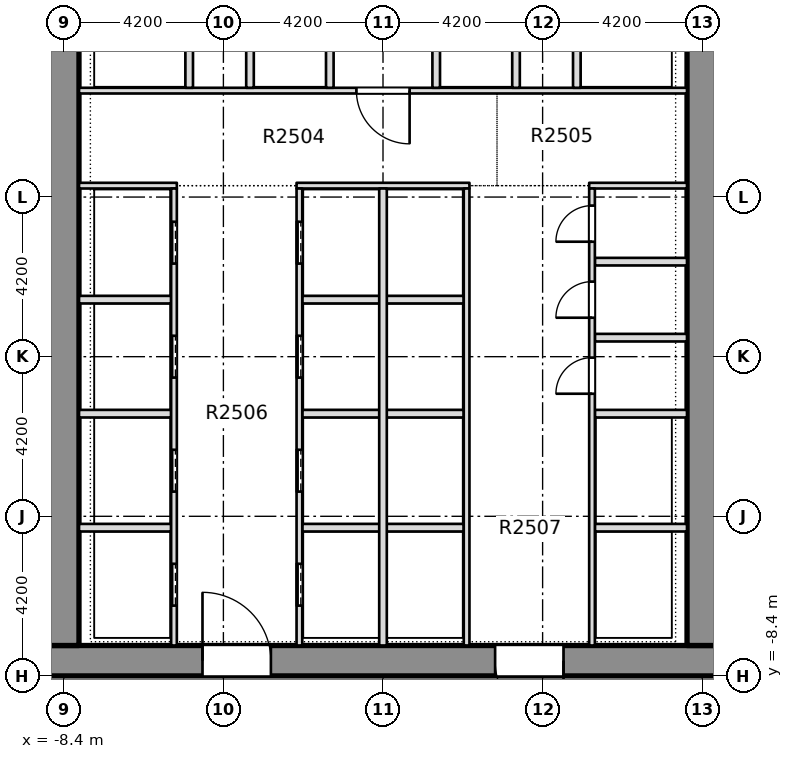
"""IFC4 building model, lengths in metres.
Left out: names, types, materials, properties, quantities, classifications, styles, units other than length and angle.
Written with IfcOpenShell. Run it as: python <this file> out.ifc"""

import sys

from ifc_helpers import new_model, si_unit, direction, frame, frame_2d, origin, place, context, subcontext, project, spatial, rectangle, extrude, element, fill, save


model = new_model("IFC4")
c1 = context("Model", 3, precision=1e-05, world=origin(), true_north=direction((0.0, 1.0)))
c2 = subcontext(c1, "Body", "Model", "MODEL_VIEW")
j1 = project(units=[si_unit("LENGTHUNIT", "METRE"), si_unit("PLANEANGLEUNIT", "RADIAN")], contexts=[c1])
p1 = place(None, origin())
s1 = spatial("IfcSite", under=j1, at=p1, CompositionType="ELEMENT")
p2 = place(p1, origin())
s2 = spatial("IfcBuilding", under=s1, at=p2, CompositionType="ELEMENT")
p3 = place(p2, frame((0.0, 0.0, 101.1)))
s3 = spatial("IfcBuildingStorey", under=s2, at=p3, CompositionType="ELEMENT", Elevation=101.1)
p4 = place(p3, frame((-11.8, -8.0, -0.32), z_axis=(0.0, 0.0, 1.0), x_axis=(1.0, 0.0, 0.0)))
e1 = element("IfcWall", 1, at=p4, inside=s3, PredefinedType="SHEAR", context=c2, shape_type="SweptSolid", body=[
    extrude(rectangle(XDim=23.6, YDim=0.8, at=frame_2d((11.8, 0.0))), origin(), (0.0, 0.0, 1.0), 3.45),
])
p5 = place(p4, frame((7.05, 0.0, 0.32)))
e2 = element("IfcOpeningElement", 2, at=p5, cuts=e1, PredefinedType="OPENING", context=c2, shape_type="SweptSolid", body=[
    extrude(rectangle(XDim=1.8, YDim=2.1, at=frame_2d((0.9, 1.05))), frame((0.0, 0.41, 0.0), z_axis=(0.0, -1.0, 0.0), x_axis=(1.0, 0.0, 0.0)), (0.0, 0.0, 1.0), 0.82),
])
p6 = place(p4, frame((14.75, 0.0, 0.32)))
e3 = element("IfcOpeningElement", 3, at=p6, cuts=e1, PredefinedType="OPENING", context=c2, shape_type="SweptSolid", body=[
    extrude(rectangle(XDim=1.8, YDim=2.1, at=frame_2d((0.9, 1.05))), frame((0.0, 0.41, 0.0), z_axis=(0.0, -1.0, 0.0), x_axis=(1.0, 0.0, 0.0)), (0.0, 0.0, 1.0), 0.82),
])
p7 = place(p3, frame((-8.4, -7.6, -0.32), z_axis=(0.0, 0.0, 1.0), x_axis=(0.0, 1.0, 0.0)))
e4 = element("IfcWall", 4, at=p7, inside=s3, PredefinedType="SHEAR", context=c2, shape_type="SweptSolid", body=[
    extrude(rectangle(XDim=28.55, YDim=0.8, at=frame_2d((14.275, 0.0))), origin(), (0.0, 0.0, 1.0), 3.45),
])
p8 = place(p7, frame((18.5, 0.0, 0.32)))
e5 = element("IfcOpeningElement", 5, at=p8, cuts=e4, PredefinedType="OPENING", context=c2, shape_type="SweptSolid", body=[
    extrude(rectangle(XDim=1.2, YDim=2.1, at=frame_2d((0.6, 1.05))), frame((0.0, 0.41, 0.0), z_axis=(0.0, -1.0, 0.0), x_axis=(1.0, 0.0, 0.0)), (0.0, 0.0, 1.0), 0.82),
])
p9 = place(p3, frame((8.4, -7.6, -0.32), z_axis=(0.0, 0.0, 1.0), x_axis=(0.0, 1.0, 0.0)))
e6 = element("IfcWall", 6, at=p9, inside=s3, PredefinedType="SHEAR", context=c2, shape_type="SweptSolid", body=[
    extrude(rectangle(XDim=28.55, YDim=0.8, at=frame_2d((14.275, 0.0))), origin(), (0.0, 0.0, 1.0), 3.45),
])
p10 = place(p9, frame((18.5, 0.0, 0.32)))
e7 = element("IfcOpeningElement", 7, at=p10, cuts=e6, PredefinedType="OPENING", context=c2, shape_type="SweptSolid", body=[
    extrude(rectangle(XDim=1.2, YDim=2.1, at=frame_2d((0.6, 1.05))), frame((0.0, 0.41, 0.0), z_axis=(0.0, -1.0, 0.0), x_axis=(1.0, 0.0, 0.0)), (0.0, 0.0, 1.0), 0.82),
])
p11 = place(p3, frame((-7.999, -4.5, 0.0), z_axis=(0.0, 0.0, 1.0), x_axis=(1.0, 0.0, 0.0)))
e8 = element("IfcWall", 8, at=p11, inside=s3, PredefinedType="PARTITIONING", context=c2, shape_type="SweptSolid", body=[
    extrude(rectangle(XDim=2.424, YDim=0.2, at=frame_2d((1.212, 0.0))), origin(), (0.0, 0.0, 1.0), 3.13),
])
p12 = place(p3, frame((-2.125, -4.5, 0.0), z_axis=(0.0, 0.0, 1.0), x_axis=(1.0, 0.0, 0.0)))
e9 = element("IfcWall", 9, at=p12, inside=s3, PredefinedType="PARTITIONING", context=c2, shape_type="SweptSolid", body=[
    extrude(rectangle(XDim=4.25, YDim=0.2, at=frame_2d((2.125, 0.0))), origin(), (0.0, 0.0, 1.0), 3.13),
])
for number, where, z_axis, x_axis in (
    (10, (5.575, -4.5, 0.0), (0.0, 0.0, 1.0), (1.0, 0.0, 0.0)),
    (11, (-7.999, -1.5, 0.0), (0.0, 0.0, 1.0), (1.0, 0.0, 0.0)),
):
    element("IfcWall", number, at=place(p3, frame(where, z_axis=z_axis, x_axis=x_axis)), inside=s3, PredefinedType="PARTITIONING", context=c2, shape_type="SweptSolid", body=[
        extrude(rectangle(XDim=2.424, YDim=0.2, at=frame_2d((1.212, 0.0))), origin(), (0.0, 0.0, 1.0), 3.13),
    ])
p13 = place(p3, frame((-2.125, -1.5, 0.0), z_axis=(0.0, 0.0, 1.0), x_axis=(1.0, 0.0, 0.0)))
e12 = element("IfcWall", 12, at=p13, inside=s3, PredefinedType="PARTITIONING", context=c2, shape_type="SweptSolid", body=[
    extrude(rectangle(XDim=4.25, YDim=0.2, at=frame_2d((2.125, 0.0))), origin(), (0.0, 0.0, 1.0), 3.13),
])
for number, where, z_axis, x_axis in (
    (13, (5.575, -1.5, 0.0), (0.0, 0.0, 1.0), (1.0, 0.0, 0.0)),
    (14, (5.575, 0.5, 0.0), (0.0, 0.0, 1.0), (1.0, 0.0, 0.0)),
    (15, (-7.999, 1.5, 0.0), (0.0, 0.0, 1.0), (1.0, 0.0, 0.0)),
):
    element("IfcWall", number, at=place(p3, frame(where, z_axis=z_axis, x_axis=x_axis)), inside=s3, PredefinedType="PARTITIONING", context=c2, shape_type="SweptSolid", body=[
        extrude(rectangle(XDim=2.424, YDim=0.2, at=frame_2d((1.212, 0.0))), origin(), (0.0, 0.0, 1.0), 3.13),
    ])
p14 = place(p3, frame((-2.125, 1.5, 0.0), z_axis=(0.0, 0.0, 1.0), x_axis=(1.0, 0.0, 0.0)))
e16 = element("IfcWall", 16, at=p14, inside=s3, PredefinedType="PARTITIONING", context=c2, shape_type="SweptSolid", body=[
    extrude(rectangle(XDim=4.25, YDim=0.2, at=frame_2d((2.125, 0.0))), origin(), (0.0, 0.0, 1.0), 3.13),
])
p15 = place(p3, frame((5.575, 2.5, 0.0), z_axis=(0.0, 0.0, 1.0), x_axis=(1.0, 0.0, 0.0)))
e17 = element("IfcWall", 17, at=p15, inside=s3, PredefinedType="PARTITIONING", context=c2, shape_type="SweptSolid", body=[
    extrude(rectangle(XDim=2.424, YDim=0.2, at=frame_2d((1.212, 0.0))), origin(), (0.0, 0.0, 1.0), 3.13),
])
p16 = place(p3, frame((-7.999, 4.5, 0.0), z_axis=(0.0, 0.0, 1.0), x_axis=(1.0, 0.0, 0.0)))
e18 = element("IfcWall", 18, at=p16, inside=s3, PredefinedType="PARTITIONING", context=c2, shape_type="SweptSolid", body=[
    extrude(rectangle(XDim=2.574, YDim=0.15, at=frame_2d((1.287, 0.0))), origin(), (0.0, 0.0, 1.0), 3.13),
])
p17 = place(p3, frame((-2.275, 4.5, 0.0), z_axis=(0.0, 0.0, 1.0), x_axis=(1.0, 0.0, 0.0)))
e19 = element("IfcWall", 19, at=p17, inside=s3, PredefinedType="PARTITIONING", context=c2, shape_type="SweptSolid", body=[
    extrude(rectangle(XDim=4.55, YDim=0.15, at=frame_2d((2.275, 0.0))), origin(), (0.0, 0.0, 1.0), 3.13),
])
p18 = place(p3, frame((5.425, 4.5, 0.0), z_axis=(0.0, 0.0, 1.0), x_axis=(1.0, 0.0, 0.0)))
e20 = element("IfcWall", 20, at=p18, inside=s3, PredefinedType="PARTITIONING", context=c2, shape_type="SweptSolid", body=[
    extrude(rectangle(XDim=2.574, YDim=0.15, at=frame_2d((1.287, 0.0))), origin(), (0.0, 0.0, 1.0), 3.13),
])
p19 = place(p3, frame((-7.999, 7.0, 0.0), z_axis=(0.0, 0.0, 1.0), x_axis=(1.0, 0.0, 0.0)))
e21 = element("IfcWall", 21, at=p19, inside=s3, PredefinedType="PARTITIONING", context=c2, shape_type="SweptSolid", body=[
    extrude(rectangle(XDim=15.998, YDim=0.15, at=frame_2d((7.999, 0.0))), origin(), (0.0, 0.0, 1.0), 3.13),
])
p20 = place(p19, frame((7.299, 0.0, 0.0)))
e22 = element("IfcOpeningElement", 22, at=p20, cuts=e21, PredefinedType="OPENING", context=c2, shape_type="SweptSolid", body=[
    extrude(rectangle(XDim=1.4, YDim=2.1, at=frame_2d((0.7, 1.05))), frame((0.0, 0.085, 0.0), z_axis=(0.0, -1.0, 0.0), x_axis=(1.0, 0.0, 0.0)), (0.0, 0.0, 1.0), 0.17),
])
p21 = place(p3, frame((-5.5, -7.599, 0.0), z_axis=(0.0, 0.0, 1.0), x_axis=(0.0, 1.0, 0.0)))
e23 = element("IfcWall", 23, at=p21, inside=s3, PredefinedType="PARTITIONING", context=c2, shape_type="SweptSolid", body=[
    extrude(rectangle(XDim=12.024, YDim=0.15, at=frame_2d((6.012, 0.0))), origin(), (0.0, 0.0, 1.0), 3.13),
])
p22 = place(p21, frame((1.049, 0.0, 0.0)))
e24 = element("IfcOpeningElement", 24, at=p22, cuts=e23, PredefinedType="OPENING", context=c2, shape_type="SweptSolid", body=[
    extrude(rectangle(XDim=1.1, YDim=2.1, at=frame_2d((0.55, 1.05))), frame((0.0, 0.085, 0.0), z_axis=(0.0, -1.0, 0.0), x_axis=(1.0, 0.0, 0.0)), (0.0, 0.0, 1.0), 0.17),
])
p23 = place(p21, frame((4.049, 0.0, 0.0)))
e25 = element("IfcOpeningElement", 25, at=p23, cuts=e23, PredefinedType="OPENING", context=c2, shape_type="SweptSolid", body=[
    extrude(rectangle(XDim=1.1, YDim=2.1, at=frame_2d((0.55, 1.05))), frame((0.0, 0.085, 0.0), z_axis=(0.0, -1.0, 0.0), x_axis=(1.0, 0.0, 0.0)), (0.0, 0.0, 1.0), 0.17),
])
p24 = place(p21, frame((7.049, 0.0, 0.0)))
e26 = element("IfcOpeningElement", 26, at=p24, cuts=e23, PredefinedType="OPENING", context=c2, shape_type="SweptSolid", body=[
    extrude(rectangle(XDim=1.1, YDim=2.1, at=frame_2d((0.55, 1.05))), frame((0.0, 0.085, 0.0), z_axis=(0.0, -1.0, 0.0), x_axis=(1.0, 0.0, 0.0)), (0.0, 0.0, 1.0), 0.17),
])
p25 = place(p21, frame((10.049, 0.0, 0.0)))
e27 = element("IfcOpeningElement", 27, at=p25, cuts=e23, PredefinedType="OPENING", context=c2, shape_type="SweptSolid", body=[
    extrude(rectangle(XDim=1.1, YDim=2.1, at=frame_2d((0.55, 1.05))), frame((0.0, 0.085, 0.0), z_axis=(0.0, -1.0, 0.0), x_axis=(1.0, 0.0, 0.0)), (0.0, 0.0, 1.0), 0.17),
])
p26 = place(p3, frame((-5.1, 7.075, 0.0), z_axis=(0.0, 0.0, 1.0), x_axis=(0.0, 1.0, 0.0)))
e28 = element("IfcWall", 28, at=p26, inside=s3, PredefinedType="PARTITIONING", context=c2, shape_type="SweptSolid", body=[
    extrude(rectangle(XDim=2.725, YDim=0.2, at=frame_2d((1.363, 0.0))), origin(), (0.0, 0.0, 1.0), 3.13),
])
p27 = place(p3, frame((-3.5, 7.075, 0.0), z_axis=(0.0, 0.0, 1.0), x_axis=(0.0, 1.0, 0.0)))
e29 = element("IfcWall", 29, at=p27, inside=s3, PredefinedType="PARTITIONING", context=c2, shape_type="SweptSolid", body=[
    extrude(rectangle(XDim=2.85, YDim=0.2, at=frame_2d((1.425, 0.0))), origin(), (0.0, 0.0, 1.0), 3.13),
])
p28 = place(p3, frame((-2.2, -7.599, 0.0), z_axis=(0.0, 0.0, 1.0), x_axis=(0.0, 1.0, 0.0)))
e30 = element("IfcWall", 30, at=p28, inside=s3, PredefinedType="PARTITIONING", context=c2, shape_type="SweptSolid", body=[
    extrude(rectangle(XDim=12.024, YDim=0.15, at=frame_2d((6.012, 0.0))), origin(), (0.0, 0.0, 1.0), 3.13),
])
p29 = place(p28, frame((1.049, 0.0, 0.0)))
e31 = element("IfcOpeningElement", 31, at=p29, cuts=e30, PredefinedType="OPENING", context=c2, shape_type="SweptSolid", body=[
    extrude(rectangle(XDim=1.1, YDim=2.1, at=frame_2d((0.55, 1.05))), frame((0.0, 0.085, 0.0), z_axis=(0.0, -1.0, 0.0), x_axis=(1.0, 0.0, 0.0)), (0.0, 0.0, 1.0), 0.17),
])
p30 = place(p28, frame((4.049, 0.0, 0.0)))
e32 = element("IfcOpeningElement", 32, at=p30, cuts=e30, PredefinedType="OPENING", context=c2, shape_type="SweptSolid", body=[
    extrude(rectangle(XDim=1.1, YDim=2.1, at=frame_2d((0.55, 1.05))), frame((0.0, 0.085, 0.0), z_axis=(0.0, -1.0, 0.0), x_axis=(1.0, 0.0, 0.0)), (0.0, 0.0, 1.0), 0.17),
])
p31 = place(p28, frame((7.049, 0.0, 0.0)))
e33 = element("IfcOpeningElement", 33, at=p31, cuts=e30, PredefinedType="OPENING", context=c2, shape_type="SweptSolid", body=[
    extrude(rectangle(XDim=1.1, YDim=2.1, at=frame_2d((0.55, 1.05))), frame((0.0, 0.085, 0.0), z_axis=(0.0, -1.0, 0.0), x_axis=(1.0, 0.0, 0.0)), (0.0, 0.0, 1.0), 0.17),
])
p32 = place(p28, frame((10.049, 0.0, 0.0)))
e34 = element("IfcOpeningElement", 34, at=p32, cuts=e30, PredefinedType="OPENING", context=c2, shape_type="SweptSolid", body=[
    extrude(rectangle(XDim=1.1, YDim=2.1, at=frame_2d((0.55, 1.05))), frame((0.0, 0.085, 0.0), z_axis=(0.0, -1.0, 0.0), x_axis=(1.0, 0.0, 0.0)), (0.0, 0.0, 1.0), 0.17),
])
p33 = place(p3, frame((-1.4, 7.075, 0.0), z_axis=(0.0, 0.0, 1.0), x_axis=(0.0, 1.0, 0.0)))
e35 = element("IfcWall", 35, at=p33, inside=s3, PredefinedType="PARTITIONING", context=c2, shape_type="SweptSolid", body=[
    extrude(rectangle(XDim=2.85, YDim=0.2, at=frame_2d((1.425, 0.0))), origin(), (0.0, 0.0, 1.0), 3.13),
])
p34 = place(p3, frame((0.0, -7.599, 0.0), z_axis=(0.0, 0.0, 1.0), x_axis=(0.0, 1.0, 0.0)))
e36 = element("IfcWall", 36, at=p34, inside=s3, PredefinedType="PARTITIONING", context=c2, shape_type="SweptSolid", body=[
    extrude(rectangle(XDim=12.024, YDim=0.2, at=frame_2d((6.012, 0.0))), origin(), (0.0, 0.0, 1.0), 3.13),
])
p35 = place(p3, frame((1.4, 7.075, 0.0), z_axis=(0.0, 0.0, 1.0), x_axis=(0.0, 1.0, 0.0)))
e37 = element("IfcWall", 37, at=p35, inside=s3, PredefinedType="PARTITIONING", context=c2, shape_type="SweptSolid", body=[
    extrude(rectangle(XDim=2.85, YDim=0.2, at=frame_2d((1.425, 0.0))), origin(), (0.0, 0.0, 1.0), 3.13),
])
p36 = place(p3, frame((2.2, -7.599, 0.0), z_axis=(0.0, 0.0, 1.0), x_axis=(0.0, 1.0, 0.0)))
e38 = element("IfcWall", 38, at=p36, inside=s3, PredefinedType="PARTITIONING", context=c2, shape_type="SweptSolid", body=[
    extrude(rectangle(XDim=12.024, YDim=0.15, at=frame_2d((6.012, 0.0))), origin(), (0.0, 0.0, 1.0), 3.13),
])
p37 = place(p3, frame((3.5, 7.075, 0.0), z_axis=(0.0, 0.0, 1.0), x_axis=(0.0, 1.0, 0.0)))
e39 = element("IfcWall", 39, at=p37, inside=s3, PredefinedType="PARTITIONING", context=c2, shape_type="SweptSolid", body=[
    extrude(rectangle(XDim=2.85, YDim=0.2, at=frame_2d((1.425, 0.0))), origin(), (0.0, 0.0, 1.0), 3.13),
])
p38 = place(p3, frame((5.1, 7.075, 0.0), z_axis=(0.0, 0.0, 1.0), x_axis=(0.0, 1.0, 0.0)))
e40 = element("IfcWall", 40, at=p38, inside=s3, PredefinedType="PARTITIONING", context=c2, shape_type="SweptSolid", body=[
    extrude(rectangle(XDim=2.725, YDim=0.2, at=frame_2d((1.363, 0.0))), origin(), (0.0, 0.0, 1.0), 3.13),
])
p39 = place(p3, frame((5.5, -7.599, 0.0), z_axis=(0.0, 0.0, 1.0), x_axis=(0.0, 1.0, 0.0)))
e41 = element("IfcWall", 41, at=p39, inside=s3, PredefinedType="PARTITIONING", context=c2, shape_type="SweptSolid", body=[
    extrude(rectangle(XDim=12.024, YDim=0.15, at=frame_2d((6.012, 0.0))), origin(), (0.0, 0.0, 1.0), 3.13),
])
p40 = place(p39, frame((6.624, 0.0, 0.0)))
e42 = element("IfcOpeningElement", 42, at=p40, cuts=e41, PredefinedType="OPENING", context=c2, shape_type="SweptSolid", body=[
    extrude(rectangle(XDim=0.95, YDim=2.1, at=frame_2d((0.475, 1.05))), frame((0.0, 0.085, 0.0), z_axis=(0.0, -1.0, 0.0), x_axis=(1.0, 0.0, 0.0)), (0.0, 0.0, 1.0), 0.17),
])
p41 = place(p39, frame((8.624, 0.0, 0.0)))
e43 = element("IfcOpeningElement", 43, at=p41, cuts=e41, PredefinedType="OPENING", context=c2, shape_type="SweptSolid", body=[
    extrude(rectangle(XDim=0.95, YDim=2.1, at=frame_2d((0.475, 1.05))), frame((0.0, 0.085, 0.0), z_axis=(0.0, -1.0, 0.0), x_axis=(1.0, 0.0, 0.0)), (0.0, 0.0, 1.0), 0.17),
])
p42 = place(p39, frame((10.624, 0.0, 0.0)))
e44 = element("IfcOpeningElement", 44, at=p42, cuts=e41, PredefinedType="OPENING", context=c2, shape_type="SweptSolid", body=[
    extrude(rectangle(XDim=0.95, YDim=2.1, at=frame_2d((0.475, 1.05))), frame((0.0, 0.085, 0.0), z_axis=(0.0, -1.0, 0.0), x_axis=(1.0, 0.0, 0.0)), (0.0, 0.0, 1.0), 0.17),
])
p43 = place(p22, origin())
e45 = element("IfcDoor", 45, at=p43, inside=s3, OperationType="SLIDING_TO_LEFT", PredefinedType="DOOR", context=c2, shape_type="SweptSolid", body=[
    extrude(rectangle(XDim=1.1, YDim=2.1, at=frame_2d((0.55, 1.05))), frame((0.0, 0.025, 0.0), z_axis=(0.0, -1.0, 0.0), x_axis=(1.0, 0.0, 0.0)), (0.0, 0.0, 1.0), 0.05),
])
fill(e24, e45)
p44 = place(p23, origin())
e46 = element("IfcDoor", 46, at=p44, inside=s3, OperationType="SLIDING_TO_LEFT", PredefinedType="DOOR", context=c2, shape_type="SweptSolid", body=[
    extrude(rectangle(XDim=1.1, YDim=2.1, at=frame_2d((0.55, 1.05))), frame((0.0, 0.025, 0.0), z_axis=(0.0, -1.0, 0.0), x_axis=(1.0, 0.0, 0.0)), (0.0, 0.0, 1.0), 0.05),
])
fill(e25, e46)
p45 = place(p24, origin())
e47 = element("IfcDoor", 47, at=p45, inside=s3, OperationType="SLIDING_TO_LEFT", PredefinedType="DOOR", context=c2, shape_type="SweptSolid", body=[
    extrude(rectangle(XDim=1.1, YDim=2.1, at=frame_2d((0.55, 1.05))), frame((0.0, 0.025, 0.0), z_axis=(0.0, -1.0, 0.0), x_axis=(1.0, 0.0, 0.0)), (0.0, 0.0, 1.0), 0.05),
])
fill(e26, e47)
p46 = place(p25, origin())
e48 = element("IfcDoor", 48, at=p46, inside=s3, OperationType="SLIDING_TO_LEFT", PredefinedType="DOOR", context=c2, shape_type="SweptSolid", body=[
    extrude(rectangle(XDim=1.1, YDim=2.1, at=frame_2d((0.55, 1.05))), frame((0.0, 0.025, 0.0), z_axis=(0.0, -1.0, 0.0), x_axis=(1.0, 0.0, 0.0)), (0.0, 0.0, 1.0), 0.05),
])
fill(e27, e48)
p47 = place(p29, origin())
e49 = element("IfcDoor", 49, at=p47, inside=s3, OperationType="SLIDING_TO_LEFT", PredefinedType="DOOR", context=c2, shape_type="SweptSolid", body=[
    extrude(rectangle(XDim=1.1, YDim=2.1, at=frame_2d((0.55, 1.05))), frame((0.0, 0.025, 0.0), z_axis=(0.0, -1.0, 0.0), x_axis=(1.0, 0.0, 0.0)), (0.0, 0.0, 1.0), 0.05),
])
fill(e31, e49)
p48 = place(p30, origin())
e50 = element("IfcDoor", 50, at=p48, inside=s3, OperationType="SLIDING_TO_LEFT", PredefinedType="DOOR", context=c2, shape_type="SweptSolid", body=[
    extrude(rectangle(XDim=1.1, YDim=2.1, at=frame_2d((0.55, 1.05))), frame((0.0, 0.025, 0.0), z_axis=(0.0, -1.0, 0.0), x_axis=(1.0, 0.0, 0.0)), (0.0, 0.0, 1.0), 0.05),
])
fill(e32, e50)
p49 = place(p31, origin())
e51 = element("IfcDoor", 51, at=p49, inside=s3, OperationType="SLIDING_TO_LEFT", PredefinedType="DOOR", context=c2, shape_type="SweptSolid", body=[
    extrude(rectangle(XDim=1.1, YDim=2.1, at=frame_2d((0.55, 1.05))), frame((0.0, 0.025, 0.0), z_axis=(0.0, -1.0, 0.0), x_axis=(1.0, 0.0, 0.0)), (0.0, 0.0, 1.0), 0.05),
])
fill(e33, e51)
p50 = place(p32, origin())
e52 = element("IfcDoor", 52, at=p50, inside=s3, OperationType="SLIDING_TO_LEFT", PredefinedType="DOOR", context=c2, shape_type="SweptSolid", body=[
    extrude(rectangle(XDim=1.1, YDim=2.1, at=frame_2d((0.55, 1.05))), frame((0.0, 0.025, 0.0), z_axis=(0.0, -1.0, 0.0), x_axis=(1.0, 0.0, 0.0)), (0.0, 0.0, 1.0), 0.05),
])
fill(e34, e52)
p51 = place(p40, origin())
e53 = element("IfcDoor", 53, at=p51, inside=s3, OperationType="SINGLE_SWING_RIGHT", PredefinedType="DOOR", context=c2, shape_type="SweptSolid", body=[
    extrude(rectangle(XDim=0.95, YDim=2.1, at=frame_2d((0.475, 1.05))), frame((0.0, 0.025, 0.0), z_axis=(0.0, -1.0, 0.0), x_axis=(1.0, 0.0, 0.0)), (0.0, 0.0, 1.0), 0.05),
])
fill(e42, e53)
p52 = place(p41, origin())
e54 = element("IfcDoor", 54, at=p52, inside=s3, OperationType="SINGLE_SWING_LEFT", PredefinedType="DOOR", context=c2, shape_type="SweptSolid", body=[
    extrude(rectangle(XDim=0.95, YDim=2.1, at=frame_2d((0.475, 1.05))), frame((0.0, 0.025, 0.0), z_axis=(0.0, -1.0, 0.0), x_axis=(1.0, 0.0, 0.0)), (0.0, 0.0, 1.0), 0.05),
])
fill(e43, e54)
p53 = place(p42, origin())
e55 = element("IfcDoor", 55, at=p53, inside=s3, OperationType="SINGLE_SWING_RIGHT", PredefinedType="DOOR", context=c2, shape_type="SweptSolid", body=[
    extrude(rectangle(XDim=0.95, YDim=2.1, at=frame_2d((0.475, 1.05))), frame((0.0, 0.025, 0.0), z_axis=(0.0, -1.0, 0.0), x_axis=(1.0, 0.0, 0.0)), (0.0, 0.0, 1.0), 0.05),
])
fill(e44, e55)
p54 = place(p20, origin())
e56 = element("IfcDoor", 56, at=p54, inside=s3, OperationType="SINGLE_SWING_RIGHT", PredefinedType="DOOR", context=c2, shape_type="SweptSolid", body=[
    extrude(rectangle(XDim=1.4, YDim=2.1, at=frame_2d((0.7, 1.05))), frame((0.0, 0.025, 0.0), z_axis=(0.0, -1.0, 0.0), x_axis=(1.0, 0.0, 0.0)), (0.0, 0.0, 1.0), 0.05),
])
fill(e22, e56)
p55 = place(p5, origin())
e57 = element("IfcDoor", 57, at=p55, inside=s3, OperationType="SINGLE_SWING_LEFT", PredefinedType="DOOR", context=c2, shape_type="SweptSolid", body=[
    extrude(rectangle(XDim=1.8, YDim=2.1, at=frame_2d((0.9, 1.05))), frame((0.0, 0.025, 0.0), z_axis=(0.0, -1.0, 0.0), x_axis=(1.0, 0.0, 0.0)), (0.0, 0.0, 1.0), 0.05),
])
fill(e2, e57)
p56 = place(p6, origin())
e58 = element("IfcDoor", 58, at=p56, inside=s3, OperationType="SINGLE_SWING_LEFT", PredefinedType="DOOR", context=c2, shape_type="SweptSolid", body=[
    extrude(rectangle(XDim=1.8, YDim=2.1, at=frame_2d((0.9, 1.05))), frame((0.0, 0.025, 0.0), z_axis=(0.0, -1.0, 0.0), x_axis=(1.0, 0.0, 0.0)), (0.0, 0.0, 1.0), 0.05),
])
fill(e3, e58)
save(model, sys.argv[1])
